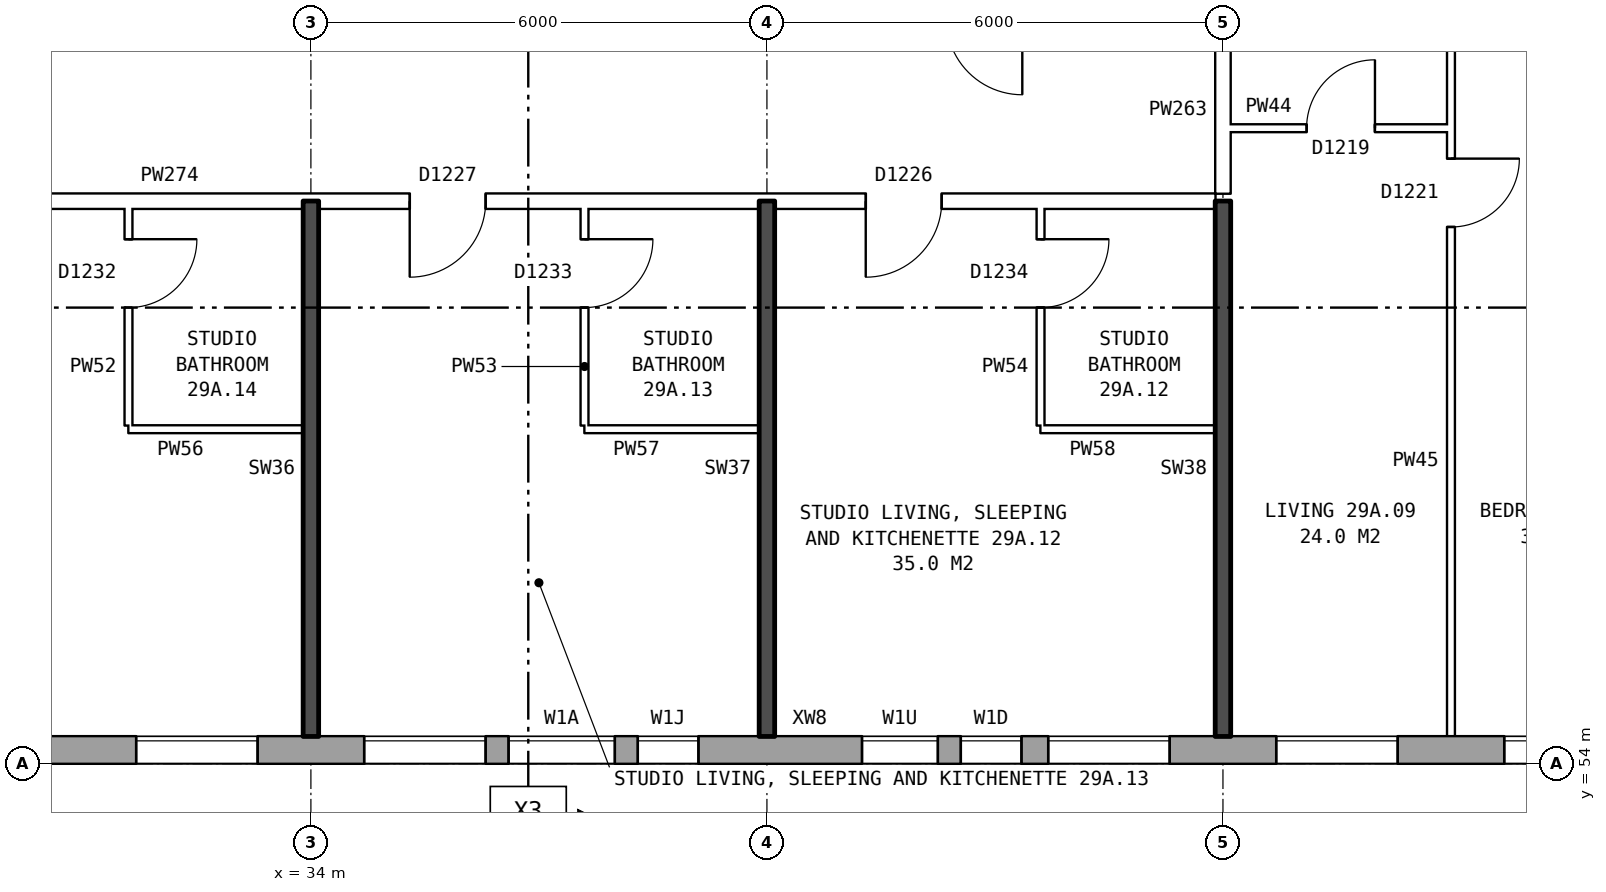
"""IFC4 building model, lengths in metres.
Left out: names, types, materials, properties, quantities, classifications, styles, units other than length and angle.
Written with IfcOpenShell. Run it as: python <this file> out.ifc"""

import sys

from ifc_helpers import new_model, si_unit, direction, frame, frame_2d, origin, place, context, subcontext, project, spatial, rectangle, extrude, element, fill, save


model = new_model("IFC4")
c1 = context("Model", 3, precision=1e-05, world=origin(), true_north=direction((0.0, 1.0)))
c2 = subcontext(c1, "Body", "Model", "MODEL_VIEW")
j1 = project(units=[si_unit("LENGTHUNIT", "METRE"), si_unit("PLANEANGLEUNIT", "RADIAN")], contexts=[c1])
p1 = place(None, origin())
s1 = spatial("IfcSite", under=j1, at=p1, CompositionType="ELEMENT")
p2 = place(p1, origin())
s2 = spatial("IfcBuilding", under=s1, at=p2, CompositionType="ELEMENT")
p3 = place(p2, frame((0.0, 0.0, 105.7)))
s3 = spatial("IfcBuildingStorey", under=s2, at=p3, CompositionType="ELEMENT", Elevation=105.7)
p4 = place(p3, frame((28.075, 54.18, 0.0), z_axis=(0.0, 0.0, 1.0), x_axis=(1.0, 0.0, 0.0)))
e1 = element("IfcWall", 1, at=p4, inside=s3, PredefinedType="STANDARD", context=c2, shape_type="SweptSolid", body=[
    extrude(rectangle(XDim=44.851, YDim=0.36, at=frame_2d((22.425, 0.0))), origin(), (0.0, 0.0, 1.0), 2.85),
])
p5 = place(p4, frame((0.625, 0.0, 0.8)))
e2 = element("IfcOpeningElement", 2, at=p5, cuts=e1, PredefinedType="OPENING", context=c2, shape_type="SweptSolid", body=[
    extrude(rectangle(XDim=1.6, YDim=1.8, at=frame_2d((0.8, 0.9))), frame((0.0, 0.19, 0.0), z_axis=(0.0, -1.0, 0.0), x_axis=(1.0, 0.0, 0.0)), (0.0, 0.0, 1.0), 0.38),
])
p6 = place(p4, frame((3.625, 0.0, 0.8)))
e3 = element("IfcOpeningElement", 3, at=p6, cuts=e1, PredefinedType="OPENING", context=c2, shape_type="SweptSolid", body=[
    extrude(rectangle(XDim=1.6, YDim=1.8, at=frame_2d((0.8, 0.9))), frame((0.0, 0.19, 0.0), z_axis=(0.0, -1.0, 0.0), x_axis=(1.0, 0.0, 0.0)), (0.0, 0.0, 1.0), 0.38),
])
p7 = place(p4, frame((6.625, 0.0, 0.8)))
e4 = element("IfcOpeningElement", 4, at=p7, cuts=e1, PredefinedType="OPENING", context=c2, shape_type="SweptSolid", body=[
    extrude(rectangle(XDim=1.6, YDim=1.8, at=frame_2d((0.8, 0.9))), frame((0.0, 0.19, 0.0), z_axis=(0.0, -1.0, 0.0), x_axis=(1.0, 0.0, 0.0)), (0.0, 0.0, 1.0), 0.38),
])
p8 = place(p4, frame((8.525, 0.0, 0.8)))
e5 = element("IfcOpeningElement", 5, at=p8, cuts=e1, PredefinedType="OPENING", context=c2, shape_type="SweptSolid", body=[
    extrude(rectangle(XDim=1.4, YDim=1.8, at=frame_2d((0.7, 0.9))), frame((0.0, 0.19, 0.0), z_axis=(0.0, -1.0, 0.0), x_axis=(1.0, 0.0, 0.0)), (0.0, 0.0, 1.0), 0.38),
])
p9 = place(p4, frame((13.175, 0.0, 0.8)))
e6 = element("IfcOpeningElement", 6, at=p9, cuts=e1, PredefinedType="OPENING", context=c2, shape_type="SweptSolid", body=[
    extrude(rectangle(XDim=1.0, YDim=0.9, at=frame_2d((0.5, 0.45))), frame((0.0, 0.19, 0.0), z_axis=(0.0, -1.0, 0.0), x_axis=(1.0, 0.0, 0.0)), (0.0, 0.0, 1.0), 0.38),
])
p10 = place(p4, frame((15.625, 0.0, 0.8)))
e7 = element("IfcOpeningElement", 7, at=p10, cuts=e1, PredefinedType="OPENING", context=c2, shape_type="SweptSolid", body=[
    extrude(rectangle(XDim=1.6, YDim=1.8, at=frame_2d((0.8, 0.9))), frame((0.0, 0.19, 0.0), z_axis=(0.0, -1.0, 0.0), x_axis=(1.0, 0.0, 0.0)), (0.0, 0.0, 1.0), 0.38),
])
p11 = place(p4, frame((18.625, 0.0, 0.8)))
e8 = element("IfcOpeningElement", 8, at=p11, cuts=e1, PredefinedType="OPENING", context=c2, shape_type="SweptSolid", body=[
    extrude(rectangle(XDim=1.6, YDim=1.8, at=frame_2d((0.8, 0.9))), frame((0.0, 0.19, 0.0), z_axis=(0.0, -1.0, 0.0), x_axis=(1.0, 0.0, 0.0)), (0.0, 0.0, 1.0), 0.38),
])
p12 = place(p4, frame((21.625, 0.0, 0.8)))
e9 = element("IfcOpeningElement", 9, at=p12, cuts=e1, PredefinedType="OPENING", context=c2, shape_type="SweptSolid", body=[
    extrude(rectangle(XDim=1.6, YDim=1.8, at=frame_2d((0.8, 0.9))), frame((0.0, 0.19, 0.0), z_axis=(0.0, -1.0, 0.0), x_axis=(1.0, 0.0, 0.0)), (0.0, 0.0, 1.0), 0.38),
])
p13 = place(p4, frame((24.625, 0.0, 0.8)))
e10 = element("IfcOpeningElement", 10, at=p13, cuts=e1, PredefinedType="OPENING", context=c2, shape_type="SweptSolid", body=[
    extrude(rectangle(XDim=1.6, YDim=1.8, at=frame_2d((0.8, 0.9))), frame((0.0, 0.19, 0.0), z_axis=(0.0, -1.0, 0.0), x_axis=(1.0, 0.0, 0.0)), (0.0, 0.0, 1.0), 0.38),
])
p14 = place(p4, frame((27.625, 0.0, 0.8)))
e11 = element("IfcOpeningElement", 11, at=p14, cuts=e1, PredefinedType="OPENING", context=c2, shape_type="SweptSolid", body=[
    extrude(rectangle(XDim=1.6, YDim=1.8, at=frame_2d((0.8, 0.9))), frame((0.0, 0.19, 0.0), z_axis=(0.0, -1.0, 0.0), x_axis=(1.0, 0.0, 0.0)), (0.0, 0.0, 1.0), 0.38),
])
p15 = place(p4, frame((30.125, 0.0, 0.15)))
e12 = element("IfcOpeningElement", 12, at=p15, cuts=e1, PredefinedType="OPENING", context=c2, shape_type="SweptSolid", body=[
    extrude(rectangle(XDim=1.2, YDim=1.8, at=frame_2d((0.6, 0.9))), frame((0.0, 0.19, 0.0), z_axis=(0.0, -1.0, 0.0), x_axis=(1.0, 0.0, 0.0)), (0.0, 0.0, 1.0), 0.38),
])
p16 = place(p4, frame((33.075, 0.0, 1.6)))
e13 = element("IfcOpeningElement", 13, at=p16, cuts=e1, PredefinedType="OPENING", context=c2, shape_type="SweptSolid", body=[
    extrude(rectangle(XDim=0.6, YDim=0.9, at=frame_2d((0.3, 0.45))), frame((0.0, 0.19, 0.0), z_axis=(0.0, -1.0, 0.0), x_axis=(1.0, 0.0, 0.0)), (0.0, 0.0, 1.0), 0.38),
])
p17 = place(p4, frame((36.625, 0.0, 0.8)))
e14 = element("IfcOpeningElement", 14, at=p17, cuts=e1, PredefinedType="OPENING", context=c2, shape_type="SweptSolid", body=[
    extrude(rectangle(XDim=1.6, YDim=1.8, at=frame_2d((0.8, 0.9))), frame((0.0, 0.19, 0.0), z_axis=(0.0, -1.0, 0.0), x_axis=(1.0, 0.0, 0.0)), (0.0, 0.0, 1.0), 0.38),
])
p18 = place(p4, frame((39.625, 0.0, 0.8)))
e15 = element("IfcOpeningElement", 15, at=p18, cuts=e1, PredefinedType="OPENING", context=c2, shape_type="SweptSolid", body=[
    extrude(rectangle(XDim=1.6, YDim=1.8, at=frame_2d((0.8, 0.9))), frame((0.0, 0.19, 0.0), z_axis=(0.0, -1.0, 0.0), x_axis=(1.0, 0.0, 0.0)), (0.0, 0.0, 1.0), 0.38),
])
p19 = place(p4, frame((42.625, 0.0, 0.8)))
e16 = element("IfcOpeningElement", 16, at=p19, cuts=e1, PredefinedType="OPENING", context=c2, shape_type="SweptSolid", body=[
    extrude(rectangle(XDim=1.6, YDim=1.8, at=frame_2d((0.8, 0.9))), frame((0.0, 0.19, 0.0), z_axis=(0.0, -1.0, 0.0), x_axis=(1.0, 0.0, 0.0)), (0.0, 0.0, 1.0), 0.38),
])
p20 = place(p4, frame((10.225, 0.0, 1.1)))
e17 = element("IfcOpeningElement", 17, at=p20, cuts=e1, PredefinedType="OPENING", context=c2, shape_type="SweptSolid", body=[
    extrude(rectangle(XDim=0.8, YDim=1.5, at=frame_2d((0.4, 0.75))), frame((0.0, 0.19, 0.0), z_axis=(0.0, -1.0, 0.0), x_axis=(1.0, 0.0, 0.0)), (0.0, 0.0, 1.0), 0.38),
])
p21 = place(p4, frame((14.475, 0.0, 0.8)))
e18 = element("IfcOpeningElement", 18, at=p21, cuts=e1, PredefinedType="OPENING", context=c2, shape_type="SweptSolid", body=[
    extrude(rectangle(XDim=0.8, YDim=1.8, at=frame_2d((0.4, 0.9))), frame((0.0, 0.19, 0.0), z_axis=(0.0, -1.0, 0.0), x_axis=(1.0, 0.0, 0.0)), (0.0, 0.0, 1.0), 0.38),
])
p22 = place(p4, frame((31.625, 0.0, 0.25)))
e19 = element("IfcOpeningElement", 19, at=p22, cuts=e1, PredefinedType="OPENING", context=c2, shape_type="SweptSolid", body=[
    extrude(rectangle(XDim=0.8, YDim=0.9, at=frame_2d((0.4, 0.45))), frame((0.0, 0.19, 0.0), z_axis=(0.0, -1.0, 0.0), x_axis=(1.0, 0.0, 0.0)), (0.0, 0.0, 1.0), 0.38),
])
p23 = place(p4, frame((34.125, 0.0, 0.8)))
e20 = element("IfcOpeningElement", 20, at=p23, cuts=e1, PredefinedType="OPENING", context=c2, shape_type="SweptSolid", body=[
    extrude(rectangle(XDim=1.6, YDim=1.8, at=frame_2d((0.8, 0.9))), frame((0.0, 0.19, 0.0), z_axis=(0.0, -1.0, 0.0), x_axis=(1.0, 0.0, 0.0)), (0.0, 0.0, 1.0), 0.38),
])
for number, where, z_axis, x_axis in (
    (21, (31.6, 58.4, 0.0), (0.0, 0.0, 1.0), (1.0, 0.0, 0.0)),
    (22, (37.6, 58.4, 0.0), (0.0, 0.0, 1.0), (1.0, 0.0, 0.0)),
    (23, (43.6, 58.4, 0.0), (0.0, 0.0, 1.0), (1.0, 0.0, 0.0)),
):
    element("IfcWall", number, at=place(p3, frame(where, z_axis=z_axis, x_axis=x_axis)), inside=s3, PredefinedType="PARTITIONING", context=c2, shape_type="SweptSolid", body=[
        extrude(rectangle(XDim=2.3, YDim=0.1, at=frame_2d((1.15, 0.0))), origin(), (0.0, 0.0, 1.0), 2.85),
    ])
p24 = place(p3, frame((25.36, 61.4, 0.0), z_axis=(0.0, 0.0, 1.0), x_axis=(1.0, 0.0, 0.0)))
e24 = element("IfcWall", 24, at=p24, inside=s3, PredefinedType="PARTITIONING", context=c2, shape_type="SweptSolid", body=[
    extrude(rectangle(XDim=20.54, YDim=0.2, at=frame_2d((10.27, 0.0))), origin(), (0.0, 0.0, 1.0), 2.85),
])
p25 = place(p24, frame((15.94, 0.0, 0.0)))
e25 = element("IfcOpeningElement", 25, at=p25, cuts=e24, PredefinedType="OPENING", context=c2, shape_type="SweptSolid", body=[
    extrude(rectangle(XDim=1.0, YDim=2.1, at=frame_2d((0.5, 1.05))), frame((0.0, 0.11, 0.0), z_axis=(0.0, -1.0, 0.0), x_axis=(1.0, 0.0, 0.0)), (0.0, 0.0, 1.0), 0.22),
])
p26 = place(p24, frame((9.94, 0.0, 0.0)))
e26 = element("IfcOpeningElement", 26, at=p26, cuts=e24, PredefinedType="OPENING", context=c2, shape_type="SweptSolid", body=[
    extrude(rectangle(XDim=1.0, YDim=2.1, at=frame_2d((0.5, 1.05))), frame((0.0, 0.11, 0.0), z_axis=(0.0, -1.0, 0.0), x_axis=(1.0, 0.0, 0.0)), (0.0, 0.0, 1.0), 0.22),
])
p27 = place(p24, frame((2.62, 0.0, 0.0)))
e27 = element("IfcOpeningElement", 27, at=p27, cuts=e24, PredefinedType="OPENING", context=c2, shape_type="SweptSolid", body=[
    extrude(rectangle(XDim=1.0, YDim=2.1, at=frame_2d((0.5, 1.05))), frame((0.0, 0.11, 0.0), z_axis=(0.0, -1.0, 0.0), x_axis=(1.0, 0.0, 0.0)), (0.0, 0.0, 1.0), 0.22),
])
p28 = place(p3, frame((46.1, 62.36, 0.0), z_axis=(0.0, 0.0, 1.0), x_axis=(1.0, 0.0, 0.0)))
e28 = element("IfcWall", 28, at=p28, inside=s3, PredefinedType="PARTITIONING", context=c2, shape_type="SweptSolid", body=[
    extrude(rectangle(XDim=2.9, YDim=0.1, at=frame_2d((1.45, 0.0))), origin(), (0.0, 0.0, 1.0), 2.85),
])
p29 = place(p28, frame((1.0, 0.0, 0.0)))
e29 = element("IfcOpeningElement", 29, at=p29, cuts=e28, PredefinedType="OPENING", context=c2, shape_type="SweptSolid", body=[
    extrude(rectangle(XDim=0.9, YDim=2.1, at=frame_2d((0.45, 1.05))), frame((0.0, 0.06, 0.0), z_axis=(0.0, -1.0, 0.0), x_axis=(1.0, 0.0, 0.0)), (0.0, 0.0, 1.0), 0.12),
])
p30 = place(p3, frame((31.6, 58.45, 0.0), z_axis=(0.0, 0.0, 1.0), x_axis=(0.0, 1.0, 0.0)))
e30 = element("IfcWall", 30, at=p30, inside=s3, PredefinedType="PARTITIONING", context=c2, shape_type="SweptSolid", body=[
    extrude(rectangle(XDim=2.85, YDim=0.1, at=frame_2d((1.425, 0.0))), origin(), (0.0, 0.0, 1.0), 2.85),
])
p31 = place(p30, frame((1.55, 0.0, 0.0)))
e31 = element("IfcOpeningElement", 31, at=p31, cuts=e30, PredefinedType="OPENING", context=c2, shape_type="SweptSolid", body=[
    extrude(rectangle(XDim=0.9, YDim=2.1, at=frame_2d((0.45, 1.05))), frame((0.0, 0.06, 0.0), z_axis=(0.0, -1.0, 0.0), x_axis=(1.0, 0.0, 0.0)), (0.0, 0.0, 1.0), 0.12),
])
p32 = place(p3, frame((34.0, 54.36, 0.0), z_axis=(0.0, 0.0, 1.0), x_axis=(0.0, 1.0, 0.0)))
e32 = element("IfcWall", 32, at=p32, inside=s3, PredefinedType="SOLIDWALL", context=c2, shape_type="SweptSolid", body=[
    extrude(rectangle(XDim=7.04, YDim=0.2, at=frame_2d((3.52, 0.0))), origin(), (0.0, 0.0, 1.0), 2.85),
])
p33 = place(p3, frame((37.6, 58.45, 0.0), z_axis=(0.0, 0.0, 1.0), x_axis=(0.0, 1.0, 0.0)))
e33 = element("IfcWall", 33, at=p33, inside=s3, PredefinedType="PARTITIONING", context=c2, shape_type="SweptSolid", body=[
    extrude(rectangle(XDim=2.85, YDim=0.1, at=frame_2d((1.425, 0.0))), origin(), (0.0, 0.0, 1.0), 2.85),
])
p34 = place(p33, frame((1.55, 0.0, 0.0)))
e34 = element("IfcOpeningElement", 34, at=p34, cuts=e33, PredefinedType="OPENING", context=c2, shape_type="SweptSolid", body=[
    extrude(rectangle(XDim=0.9, YDim=2.1, at=frame_2d((0.45, 1.05))), frame((0.0, 0.06, 0.0), z_axis=(0.0, -1.0, 0.0), x_axis=(1.0, 0.0, 0.0)), (0.0, 0.0, 1.0), 0.12),
])
p35 = place(p3, frame((40.0, 54.36, 0.0), z_axis=(0.0, 0.0, 1.0), x_axis=(0.0, 1.0, 0.0)))
e35 = element("IfcWall", 35, at=p35, inside=s3, PredefinedType="SOLIDWALL", context=c2, shape_type="SweptSolid", body=[
    extrude(rectangle(XDim=7.04, YDim=0.2, at=frame_2d((3.52, 0.0))), origin(), (0.0, 0.0, 1.0), 2.85),
])
p36 = place(p3, frame((43.6, 58.45, 0.0), z_axis=(0.0, 0.0, 1.0), x_axis=(0.0, 1.0, 0.0)))
e36 = element("IfcWall", 36, at=p36, inside=s3, PredefinedType="PARTITIONING", context=c2, shape_type="SweptSolid", body=[
    extrude(rectangle(XDim=2.85, YDim=0.1, at=frame_2d((1.425, 0.0))), origin(), (0.0, 0.0, 1.0), 2.85),
])
p37 = place(p36, frame((1.55, 0.0, 0.0)))
e37 = element("IfcOpeningElement", 37, at=p37, cuts=e36, PredefinedType="OPENING", context=c2, shape_type="SweptSolid", body=[
    extrude(rectangle(XDim=0.9, YDim=2.1, at=frame_2d((0.45, 1.05))), frame((0.0, 0.06, 0.0), z_axis=(0.0, -1.0, 0.0), x_axis=(1.0, 0.0, 0.0)), (0.0, 0.0, 1.0), 0.12),
])
p38 = place(p3, frame((46.0, 54.36, 0.0), z_axis=(0.0, 0.0, 1.0), x_axis=(0.0, 1.0, 0.0)))
e38 = element("IfcWall", 38, at=p38, inside=s3, PredefinedType="SOLIDWALL", context=c2, shape_type="SweptSolid", body=[
    extrude(rectangle(XDim=7.04, YDim=0.2, at=frame_2d((3.52, 0.0))), origin(), (0.0, 0.0, 1.0), 2.85),
])
p39 = place(p3, frame((46.0, 61.5, 0.0), z_axis=(0.0, 0.0, 1.0), x_axis=(0.0, 1.0, 0.0)))
e39 = element("IfcWall", 39, at=p39, inside=s3, PredefinedType="PARTITIONING", context=c2, shape_type="SweptSolid", body=[
    extrude(rectangle(XDim=2.2, YDim=0.2, at=frame_2d((1.1, 0.0))), origin(), (0.0, 0.0, 1.0), 2.85),
])
p40 = place(p3, frame((49.0, 54.36, 0.0), z_axis=(0.0, 0.0, 1.0), x_axis=(0.0, 1.0, 0.0)))
e40 = element("IfcWall", 40, at=p40, inside=s3, PredefinedType="PARTITIONING", context=c2, shape_type="SweptSolid", body=[
    extrude(rectangle(XDim=14.34, YDim=0.1, at=frame_2d((7.17, 0.0))), origin(), (0.0, 0.0, 1.0), 2.85),
])
p41 = place(p40, frame((6.7, 0.0, 0.0)))
e41 = element("IfcOpeningElement", 41, at=p41, cuts=e40, PredefinedType="OPENING", context=c2, shape_type="SweptSolid", body=[
    extrude(rectangle(XDim=0.9, YDim=2.1, at=frame_2d((0.45, 1.05))), frame((0.0, 0.06, 0.0), z_axis=(0.0, -1.0, 0.0), x_axis=(1.0, 0.0, 0.0)), (0.0, 0.0, 1.0), 0.12),
])
p42 = place(p40, frame((13.04, 0.0, 0.0)))
e42 = element("IfcOpeningElement", 42, at=p42, cuts=e40, PredefinedType="OPENING", context=c2, shape_type="SweptSolid", body=[
    extrude(rectangle(XDim=0.9, YDim=2.1, at=frame_2d((0.45, 1.05))), frame((0.0, 0.06, 0.0), z_axis=(0.0, -1.0, 0.0), x_axis=(1.0, 0.0, 0.0)), (0.0, 0.0, 1.0), 0.12),
])
p43 = place(p6, origin())
e43 = element("IfcWindow", 43, at=p43, inside=s3, PartitioningType="SINGLE_PANEL", PredefinedType="WINDOW", context=c2, shape_type="SweptSolid", body=[
    extrude(rectangle(XDim=1.6, YDim=1.8, at=frame_2d((0.8, 0.9))), frame((0.0, 0.15, 0.0), z_axis=(0.0, -1.0, 0.0), x_axis=(1.0, 0.0, 0.0)), (0.0, 0.0, 1.0), 0.06),
])
fill(e3, e43)
p44 = place(p7, origin())
e44 = element("IfcWindow", 44, at=p44, inside=s3, PartitioningType="SINGLE_PANEL", PredefinedType="WINDOW", context=c2, shape_type="SweptSolid", body=[
    extrude(rectangle(XDim=1.6, YDim=1.8, at=frame_2d((0.8, 0.9))), frame((0.0, 0.15, 0.0), z_axis=(0.0, -1.0, 0.0), x_axis=(1.0, 0.0, 0.0)), (0.0, 0.0, 1.0), 0.06),
])
fill(e4, e44)
p45 = place(p8, origin())
e45 = element("IfcWindow", 45, at=p45, inside=s3, PartitioningType="SINGLE_PANEL", PredefinedType="WINDOW", context=c2, shape_type="SweptSolid", body=[
    extrude(rectangle(XDim=1.4, YDim=1.8, at=frame_2d((0.7, 0.9))), frame((0.0, 0.15, 0.0), z_axis=(0.0, -1.0, 0.0), x_axis=(1.0, 0.0, 0.0)), (0.0, 0.0, 1.0), 0.06),
])
fill(e5, e45)
p46 = place(p9, origin())
e46 = element("IfcWindow", 46, at=p46, inside=s3, PartitioningType="SINGLE_PANEL", PredefinedType="WINDOW", context=c2, shape_type="SweptSolid", body=[
    extrude(rectangle(XDim=1.0, YDim=0.9, at=frame_2d((0.5, 0.45))), frame((0.0, 0.15, 0.0), z_axis=(0.0, -1.0, 0.0), x_axis=(1.0, 0.0, 0.0)), (0.0, 0.0, 1.0), 0.06),
])
fill(e6, e46)
p47 = place(p10, origin())
e47 = element("IfcWindow", 47, at=p47, inside=s3, PartitioningType="SINGLE_PANEL", PredefinedType="WINDOW", context=c2, shape_type="SweptSolid", body=[
    extrude(rectangle(XDim=1.6, YDim=1.8, at=frame_2d((0.8, 0.9))), frame((0.0, 0.15, 0.0), z_axis=(0.0, -1.0, 0.0), x_axis=(1.0, 0.0, 0.0)), (0.0, 0.0, 1.0), 0.06),
])
fill(e7, e47)
p48 = place(p11, origin())
e48 = element("IfcWindow", 48, at=p48, inside=s3, PartitioningType="SINGLE_PANEL", PredefinedType="WINDOW", context=c2, shape_type="SweptSolid", body=[
    extrude(rectangle(XDim=1.6, YDim=1.8, at=frame_2d((0.8, 0.9))), frame((0.0, 0.15, 0.0), z_axis=(0.0, -1.0, 0.0), x_axis=(1.0, 0.0, 0.0)), (0.0, 0.0, 1.0), 0.06),
])
fill(e8, e48)
p49 = place(p12, origin())
e49 = element("IfcWindow", 49, at=p49, inside=s3, PartitioningType="SINGLE_PANEL", PredefinedType="WINDOW", context=c2, shape_type="SweptSolid", body=[
    extrude(rectangle(XDim=1.6, YDim=1.8, at=frame_2d((0.8, 0.9))), frame((0.0, 0.15, 0.0), z_axis=(0.0, -1.0, 0.0), x_axis=(1.0, 0.0, 0.0)), (0.0, 0.0, 1.0), 0.06),
])
fill(e9, e49)
p50 = place(p41, frame((0.9, 0.0, 0.0), z_axis=(0.0, 0.0, 1.0), x_axis=(-1.0, 0.0, 0.0)))
e50 = element("IfcDoor", 50, at=p50, inside=s3, OperationType="SINGLE_SWING_LEFT", PredefinedType="DOOR", context=c2, shape_type="SweptSolid", body=[
    extrude(rectangle(XDim=0.9, YDim=2.1, at=frame_2d((0.45, 1.05))), frame((0.0, 0.025, 0.0), z_axis=(0.0, -1.0, 0.0), x_axis=(1.0, 0.0, 0.0)), (0.0, 0.0, 1.0), 0.05),
])
fill(e41, e50)
p51 = place(p29, origin())
e51 = element("IfcDoor", 51, at=p51, inside=s3, OperationType="SINGLE_SWING_RIGHT", PredefinedType="DOOR", context=c2, shape_type="SweptSolid", body=[
    extrude(rectangle(XDim=0.9, YDim=2.1, at=frame_2d((0.45, 1.05))), frame((0.0, 0.025, 0.0), z_axis=(0.0, -1.0, 0.0), x_axis=(1.0, 0.0, 0.0)), (0.0, 0.0, 1.0), 0.05),
])
fill(e29, e51)
p52 = place(p25, frame((1.0, 0.0, 0.0), z_axis=(0.0, 0.0, 1.0), x_axis=(-1.0, 0.0, 0.0)))
e52 = element("IfcDoor", 52, at=p52, inside=s3, OperationType="SINGLE_SWING_RIGHT", PredefinedType="DOOR", context=c2, shape_type="SweptSolid", body=[
    extrude(rectangle(XDim=1.0, YDim=2.1, at=frame_2d((0.5, 1.05))), frame((0.0, 0.025, 0.0), z_axis=(0.0, -1.0, 0.0), x_axis=(1.0, 0.0, 0.0)), (0.0, 0.0, 1.0), 0.05),
])
fill(e25, e52)
p53 = place(p37, frame((0.9, 0.0, 0.0), z_axis=(0.0, 0.0, 1.0), x_axis=(-1.0, 0.0, 0.0)))
e53 = element("IfcDoor", 53, at=p53, inside=s3, OperationType="SINGLE_SWING_LEFT", PredefinedType="DOOR", context=c2, shape_type="SweptSolid", body=[
    extrude(rectangle(XDim=0.9, YDim=2.1, at=frame_2d((0.45, 1.05))), frame((0.0, 0.025, 0.0), z_axis=(0.0, -1.0, 0.0), x_axis=(1.0, 0.0, 0.0)), (0.0, 0.0, 1.0), 0.05),
])
fill(e37, e53)
p54 = place(p26, frame((1.0, 0.0, 0.0), z_axis=(0.0, 0.0, 1.0), x_axis=(-1.0, 0.0, 0.0)))
e54 = element("IfcDoor", 54, at=p54, inside=s3, OperationType="SINGLE_SWING_RIGHT", PredefinedType="DOOR", context=c2, shape_type="SweptSolid", body=[
    extrude(rectangle(XDim=1.0, YDim=2.1, at=frame_2d((0.5, 1.05))), frame((0.0, 0.025, 0.0), z_axis=(0.0, -1.0, 0.0), x_axis=(1.0, 0.0, 0.0)), (0.0, 0.0, 1.0), 0.05),
])
fill(e26, e54)
p55 = place(p34, frame((0.9, 0.0, 0.0), z_axis=(0.0, 0.0, 1.0), x_axis=(-1.0, 0.0, 0.0)))
e55 = element("IfcDoor", 55, at=p55, inside=s3, OperationType="SINGLE_SWING_LEFT", PredefinedType="DOOR", context=c2, shape_type="SweptSolid", body=[
    extrude(rectangle(XDim=0.9, YDim=2.1, at=frame_2d((0.45, 1.05))), frame((0.0, 0.025, 0.0), z_axis=(0.0, -1.0, 0.0), x_axis=(1.0, 0.0, 0.0)), (0.0, 0.0, 1.0), 0.05),
])
fill(e34, e55)
p56 = place(p31, frame((0.9, 0.0, 0.0), z_axis=(0.0, 0.0, 1.0), x_axis=(-1.0, 0.0, 0.0)))
e56 = element("IfcDoor", 56, at=p56, inside=s3, OperationType="SINGLE_SWING_LEFT", PredefinedType="DOOR", context=c2, shape_type="SweptSolid", body=[
    extrude(rectangle(XDim=0.9, YDim=2.1, at=frame_2d((0.45, 1.05))), frame((0.0, 0.025, 0.0), z_axis=(0.0, -1.0, 0.0), x_axis=(1.0, 0.0, 0.0)), (0.0, 0.0, 1.0), 0.05),
])
fill(e31, e56)
p57 = place(p20, origin())
e57 = element("IfcWindow", 57, at=p57, inside=s3, PartitioningType="SINGLE_PANEL", PredefinedType="WINDOW", context=c2, shape_type="SweptSolid", body=[
    extrude(rectangle(XDim=0.8, YDim=1.5, at=frame_2d((0.4, 0.75))), frame((0.0, 0.15, 0.0), z_axis=(0.0, -1.0, 0.0), x_axis=(1.0, 0.0, 0.0)), (0.0, 0.0, 1.0), 0.06),
])
fill(e17, e57)
p58 = place(p21, origin())
e58 = element("IfcWindow", 58, at=p58, inside=s3, PartitioningType="SINGLE_PANEL", PredefinedType="WINDOW", context=c2, shape_type="SweptSolid", body=[
    extrude(rectangle(XDim=0.8, YDim=1.8, at=frame_2d((0.4, 0.9))), frame((0.0, 0.15, 0.0), z_axis=(0.0, -1.0, 0.0), x_axis=(1.0, 0.0, 0.0)), (0.0, 0.0, 1.0), 0.06),
])
fill(e18, e58)
save(model, sys.argv[1])
